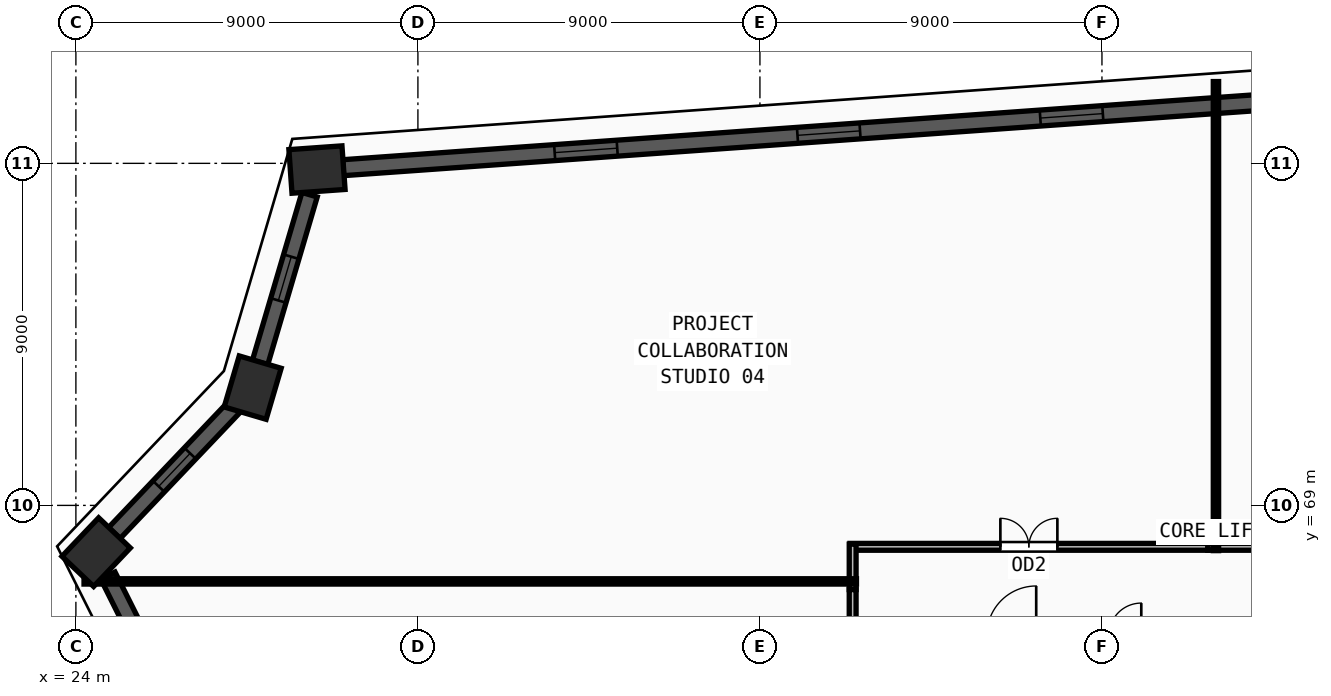
"""IFC4 building model, lengths in metres.
Left out: names, types, materials, properties, quantities, classifications, styles, units other than length and angle.
Written with IfcOpenShell. Run it as: python <this file> out.ifc"""

import sys

from ifc_helpers import new_model, si_unit, direction, frame, frame_2d, origin, origin_2d, place, context, subcontext, project, spatial, rectangle, extrude, source, transform, mapped, element, fill, save


model = new_model("IFC4")
c1 = context("Model", 3, precision=1e-05, world=origin(), true_north=direction((0.0, 1.0)))
c2 = subcontext(c1, "Body", "Model", "MODEL_VIEW")
j1 = project(units=[si_unit("LENGTHUNIT", "METRE"), si_unit("PLANEANGLEUNIT", "RADIAN")], contexts=[c1])
p1 = place(None, origin())
s1 = spatial("IfcSite", under=j1, at=p1, CompositionType="ELEMENT")
p2 = place(p1, origin())
s2 = spatial("IfcBuilding", under=s1, at=p2, CompositionType="ELEMENT")
p3 = place(p2, frame((0.0, 0.0, 144.0)))
s3 = spatial("IfcBuildingStorey", under=s2, at=p3, CompositionType="ELEMENT", Elevation=144.0)
m1 = source(origin(), c2, "Body", "SweptSolid", [
    extrude(rectangle(XDim=1.4, YDim=1.15, at=origin_2d()), origin(), (0.0, 0.0, 1.0), 3.75),
])
for number, where, z_axis, x_axis in (
    (1, (24.533, 67.77, 0.0), (0.0, 0.0, 1.0), (0.689, 0.725, 0.0)),
    (2, (28.652, 72.099, 0.0), (0.0, 0.0, 1.0), (0.283, 0.959, 0.0)),
    (3, (30.344, 77.837, 0.0), (0.0, 0.0, 1.0), (0.997, 0.071, 0.0)),
):
    element("IfcColumn", number, at=place(p3, frame(where, z_axis=z_axis, x_axis=x_axis)), inside=s3, PredefinedType="COLUMN", context=c2, shape_type="MappedRepresentation", body=[
        mapped(m1, transform((0.0, 0.0, 0.0), x_axis=(1.0, 0.0, 0.0), y_axis=(0.0, 1.0, 0.0), z_axis=(0.0, 0.0, 1.0), scale=1.0)),
    ])
p4 = place(p3, frame((56.59, 79.705, 0.0), z_axis=(0.0, 0.0, 1.0), x_axis=(-0.997476660497, -0.070995153099, 0.0)))
e4 = element("IfcWall", 4, at=p4, inside=s3, PredefinedType="SOLIDWALL", context=c2, shape_type="SweptSolid", body=[
    extrude(rectangle(XDim=25.623, YDim=0.42, at=frame_2d((12.812, 0.0))), origin(), (0.0, 0.0, 1.0), 3.57),
])
m2 = source(origin(), c2, "Body", "SweptSolid", [
    extrude(rectangle(XDim=1.65, YDim=1.95, at=frame_2d((0.825, 0.975))), frame((0.0, 0.22, 0.0), z_axis=(0.0, -1.0, 0.0), x_axis=(1.0, 0.0, 0.0)), (0.0, 0.0, 1.0), 0.44),
])
p5 = place(p4, frame((5.581, 0.0, 0.55)))
e5 = element("IfcOpeningElement", 5, at=p5, cuts=e4, PredefinedType="OPENING", context=c2, shape_type="MappedRepresentation", body=[
    mapped(m2, transform((0.0, 0.0, 0.0), x_axis=(1.0, 0.0, 0.0), y_axis=(0.0, 1.0, 0.0), z_axis=(0.0, 0.0, 1.0), scale=1.0)),
])
p6 = place(p4, frame((11.986, 0.0, 0.55)))
e6 = element("IfcOpeningElement", 6, at=p6, cuts=e4, PredefinedType="OPENING", context=c2, shape_type="MappedRepresentation", body=[
    mapped(m2, transform((0.0, 0.0, 0.0), x_axis=(1.0, 0.0, 0.0), y_axis=(0.0, 1.0, 0.0), z_axis=(0.0, 0.0, 1.0), scale=1.0)),
])
p7 = place(p4, frame((18.392, 0.0, 0.55)))
e7 = element("IfcOpeningElement", 7, at=p7, cuts=e4, PredefinedType="OPENING", context=c2, shape_type="MappedRepresentation", body=[
    mapped(m2, transform((0.0, 0.0, 0.0), x_axis=(1.0, 0.0, 0.0), y_axis=(0.0, 1.0, 0.0), z_axis=(0.0, 0.0, 1.0), scale=1.0)),
])
p8 = place(p3, frame((30.149, 77.175, 0.0), z_axis=(0.0, 0.0, 1.0), x_axis=(-0.282915865334, -0.959144730029, 0.0)))
e8 = element("IfcWall", 8, at=p8, inside=s3, PredefinedType="SOLIDWALL", context=c2, shape_type="SweptSolid", body=[
    extrude(rectangle(XDim=4.602, YDim=0.42, at=frame_2d((2.301, 0.0))), origin(), (0.0, 0.0, 1.0), 3.57),
])
m3 = source(origin(), c2, "Body", "SweptSolid", [
    extrude(rectangle(XDim=1.2, YDim=1.9, at=frame_2d((0.6, 0.95))), frame((0.0, 0.22, 0.0), z_axis=(0.0, -1.0, 0.0), x_axis=(1.0, 0.0, 0.0)), (0.0, 0.0, 1.0), 0.44),
])
p9 = place(p8, frame((1.701, 0.0, 0.55)))
e9 = element("IfcOpeningElement", 9, at=p9, cuts=e8, PredefinedType="OPENING", context=c2, shape_type="MappedRepresentation", body=[
    mapped(m3, transform((0.0, 0.0, 0.0), x_axis=(1.0, 0.0, 0.0), y_axis=(0.0, 1.0, 0.0), z_axis=(0.0, 0.0, 1.0), scale=1.0)),
])
p10 = place(p3, frame((28.176, 71.599, 0.0), z_axis=(0.0, 0.0, 1.0), x_axis=(-0.689246421926, -0.724526997331, 0.0)))
e10 = element("IfcWall", 10, at=p10, inside=s3, PredefinedType="SOLIDWALL", context=c2, shape_type="SweptSolid", body=[
    extrude(rectangle(XDim=4.595, YDim=0.42, at=frame_2d((2.297, 0.0))), origin(), (0.0, 0.0, 1.0), 3.57),
])
p11 = place(p10, frame((1.697, 0.0, 0.55)))
e11 = element("IfcOpeningElement", 11, at=p11, cuts=e10, PredefinedType="OPENING", context=c2, shape_type="MappedRepresentation", body=[
    mapped(m3, transform((0.0, 0.0, 0.0), x_axis=(1.0, 0.0, 0.0), y_axis=(0.0, 1.0, 0.0), z_axis=(0.0, 0.0, 1.0), scale=1.0)),
])
p12 = place(p3, frame((24.842, 67.153, 0.0), z_axis=(0.0, 0.0, 1.0), x_axis=(0.447741761442, -0.894162913043, 0.0)))
e12 = element("IfcWall", 12, at=p12, inside=s3, PredefinedType="SOLIDWALL", context=c2, shape_type="SweptSolid", body=[
    extrude(rectangle(XDim=31.058, YDim=0.42, at=frame_2d((15.529, 0.0))), origin(), (0.0, 0.0, 1.0), 3.57),
])
p13 = place(p12, frame((6.94, 0.0, 0.55)))
e13 = element("IfcOpeningElement", 13, at=p13, cuts=e12, PredefinedType="OPENING", context=c2, shape_type="MappedRepresentation", body=[
    mapped(m2, transform((0.0, 0.0, 0.0), x_axis=(1.0, 0.0, 0.0), y_axis=(0.0, 1.0, 0.0), z_axis=(0.0, 0.0, 1.0), scale=1.0)),
])
p14 = place(p12, frame((16.254, 0.0, 0.55)))
e14 = element("IfcOpeningElement", 14, at=p14, cuts=e12, PredefinedType="OPENING", context=c2, shape_type="MappedRepresentation", body=[
    mapped(m2, transform((0.0, 0.0, 0.0), x_axis=(1.0, 0.0, 0.0), y_axis=(0.0, 1.0, 0.0), z_axis=(0.0, 0.0, 1.0), scale=1.0)),
])
p15 = place(p12, frame((22.469, 0.0, 0.55)))
e15 = element("IfcOpeningElement", 15, at=p15, cuts=e12, PredefinedType="OPENING", context=c2, shape_type="MappedRepresentation", body=[
    mapped(m2, transform((0.0, 0.0, 0.0), x_axis=(1.0, 0.0, 0.0), y_axis=(0.0, 1.0, 0.0), z_axis=(0.0, 0.0, 1.0), scale=1.0)),
])
p16 = place(p3, frame((53.785, 67.91, 0.0), z_axis=(0.0, 0.0, 1.0), x_axis=(1.0, 0.0, 0.0)))
e16 = element("IfcWall", 16, at=p16, inside=s3, PredefinedType="PARTITIONING", context=c2, shape_type="SweptSolid", body=[
    extrude(rectangle(XDim=10.5, YDim=0.18, at=frame_2d((5.25, 0.0))), origin(), (0.0, 0.0, 1.0), 3.57),
])
m4 = source(origin(), c2, "Body", "SweptSolid", [
    extrude(rectangle(XDim=1.5, YDim=2.2, at=frame_2d((0.75, 1.1))), frame((0.0, 0.1, 0.0), z_axis=(0.0, -1.0, 0.0), x_axis=(1.0, 0.0, 0.0)), (0.0, 0.0, 1.0), 0.2),
])
p17 = place(p16, frame((4.5, 0.0, 0.0)))
e17 = element("IfcOpeningElement", 17, at=p17, cuts=e16, PredefinedType="OPENING", context=c2, shape_type="MappedRepresentation", body=[
    mapped(m4, transform((0.0, 0.0, 0.0), x_axis=(1.0, 0.0, 0.0), y_axis=(0.0, 1.0, 0.0), z_axis=(0.0, 0.0, 1.0), scale=1.0)),
])
p18 = place(p3, frame((44.37, 67.91, 0.0), z_axis=(0.0, 0.0, 1.0), x_axis=(1.0, 0.0, 0.0)))
e18 = element("IfcWall", 18, at=p18, inside=s3, PredefinedType="PARTITIONING", context=c2, shape_type="SweptSolid", body=[
    extrude(rectangle(XDim=9.415, YDim=0.18, at=frame_2d((4.708, 0.0))), origin(), (0.0, 0.0, 1.0), 3.57),
])
p19 = place(p18, frame((3.957, 0.0, 0.0)))
e19 = element("IfcOpeningElement", 19, at=p19, cuts=e18, PredefinedType="OPENING", context=c2, shape_type="MappedRepresentation", body=[
    mapped(m4, transform((0.0, 0.0, 0.0), x_axis=(1.0, 0.0, 0.0), y_axis=(0.0, 1.0, 0.0), z_axis=(0.0, 0.0, 1.0), scale=1.0)),
])
p20 = place(p3, frame((44.44, 66.785, 0.0), z_axis=(0.0, 0.0, 1.0), x_axis=(0.0, 1.0, 0.0)))
e20 = element("IfcWall", 20, at=p20, inside=s3, PredefinedType="PARTITIONING", context=c2, shape_type="SweptSolid", body=[
    extrude(rectangle(XDim=1.195, YDim=0.18, at=frame_2d((0.598, 0.0))), origin(), (0.0, 0.0, 1.0), 3.57),
])
p21 = place(p3, frame((44.44, 56.19, 0.0), z_axis=(0.0, 0.0, 1.0), x_axis=(0.0, 1.0, 0.0)))
e21 = element("IfcWall", 21, at=p21, inside=s3, PredefinedType="PARTITIONING", context=c2, shape_type="SweptSolid", body=[
    extrude(rectangle(XDim=10.595, YDim=0.18, at=frame_2d((5.297, 0.0))), origin(), (0.0, 0.0, 1.0), 3.57),
])
p22 = place(p3, frame((44.54, 67.0, 0.0), z_axis=(0.0, 0.0, 1.0), x_axis=(-1.0, 0.0, 0.0)))
e22 = element("IfcWall", 22, at=p22, inside=s3, PredefinedType="PARTITIONING", context=c2, shape_type="SweptSolid", body=[
    extrude(rectangle(XDim=20.326, YDim=0.14, at=frame_2d((10.163, 0.0))), origin(), (0.0, 0.0, 1.0), 2.755),
])
p23 = place(p3, frame((54.0, 67.81, 0.0), z_axis=(0.0, 0.0, 1.0), x_axis=(0.0, 1.0, 0.0)))
e23 = element("IfcWall", 23, at=p23, inside=s3, PredefinedType="PARTITIONING", context=c2, shape_type="SweptSolid", body=[
    extrude(rectangle(XDim=12.342, YDim=0.14, at=frame_2d((6.171, 0.0))), origin(), (0.0, 0.0, 1.0), 3.57),
])
m5 = source(origin(), c2, "Body", "SweptSolid", [
    extrude(rectangle(XDim=1.65, YDim=1.95, at=frame_2d((0.825, 0.975))), frame((0.0, 0.03, 0.0), z_axis=(0.0, -1.0, 0.0), x_axis=(1.0, 0.0, 0.0)), (0.0, 0.0, 1.0), 0.06),
])
p24 = place(p5, origin())
e24 = element("IfcWindow", 24, at=p24, inside=s3, PartitioningType="DOUBLE_PANEL_VERTICAL", PredefinedType="WINDOW", context=c2, shape_type="MappedRepresentation", body=[
    mapped(m5, transform((0.0, 0.0, 0.0), x_axis=(1.0, 0.0, 0.0), y_axis=(0.0, 1.0, 0.0), z_axis=(0.0, 0.0, 1.0), scale=1.0)),
])
fill(e5, e24)
p25 = place(p6, origin())
e25 = element("IfcWindow", 25, at=p25, inside=s3, PartitioningType="DOUBLE_PANEL_VERTICAL", PredefinedType="WINDOW", context=c2, shape_type="MappedRepresentation", body=[
    mapped(m5, transform((0.0, 0.0, 0.0), x_axis=(1.0, 0.0, 0.0), y_axis=(0.0, 1.0, 0.0), z_axis=(0.0, 0.0, 1.0), scale=1.0)),
])
fill(e6, e25)
p26 = place(p7, origin())
e26 = element("IfcWindow", 26, at=p26, inside=s3, PartitioningType="DOUBLE_PANEL_VERTICAL", PredefinedType="WINDOW", context=c2, shape_type="MappedRepresentation", body=[
    mapped(m5, transform((0.0, 0.0, 0.0), x_axis=(1.0, 0.0, 0.0), y_axis=(0.0, 1.0, 0.0), z_axis=(0.0, 0.0, 1.0), scale=1.0)),
])
fill(e7, e26)
m6 = source(origin(), c2, "Body", "SweptSolid", [
    extrude(rectangle(XDim=1.2, YDim=1.9, at=frame_2d((0.6, 0.95))), frame((0.0, 0.03, 0.0), z_axis=(0.0, -1.0, 0.0), x_axis=(1.0, 0.0, 0.0)), (0.0, 0.0, 1.0), 0.06),
])
p27 = place(p9, origin())
e27 = element("IfcWindow", 27, at=p27, inside=s3, PartitioningType="SINGLE_PANEL", PredefinedType="WINDOW", context=c2, shape_type="MappedRepresentation", body=[
    mapped(m6, transform((0.0, 0.0, 0.0), x_axis=(1.0, 0.0, 0.0), y_axis=(0.0, 1.0, 0.0), z_axis=(0.0, 0.0, 1.0), scale=1.0)),
])
fill(e9, e27)
p28 = place(p11, origin())
e28 = element("IfcWindow", 28, at=p28, inside=s3, PartitioningType="SINGLE_PANEL", PredefinedType="WINDOW", context=c2, shape_type="MappedRepresentation", body=[
    mapped(m6, transform((0.0, 0.0, 0.0), x_axis=(1.0, 0.0, 0.0), y_axis=(0.0, 1.0, 0.0), z_axis=(0.0, 0.0, 1.0), scale=1.0)),
])
fill(e11, e28)
m7 = source(origin(), c2, "Body", "SweptSolid", [
    extrude(rectangle(XDim=1.5, YDim=2.2, at=frame_2d((0.75, 1.1))), frame((0.0, 0.025, 0.0), z_axis=(0.0, -1.0, 0.0), x_axis=(1.0, 0.0, 0.0)), (0.0, 0.0, 1.0), 0.05),
])
p29 = place(p19, origin())
e29 = element("IfcDoor", 29, at=p29, inside=s3, OperationType="DOUBLE_DOOR_SINGLE_SWING", PredefinedType="DOOR", context=c2, shape_type="MappedRepresentation", body=[
    mapped(m7, transform((0.0, 0.0, 0.0), x_axis=(1.0, 0.0, 0.0), y_axis=(0.0, 1.0, 0.0), z_axis=(0.0, 0.0, 1.0), scale=1.0)),
])
fill(e19, e29)
save(model, sys.argv[1])
